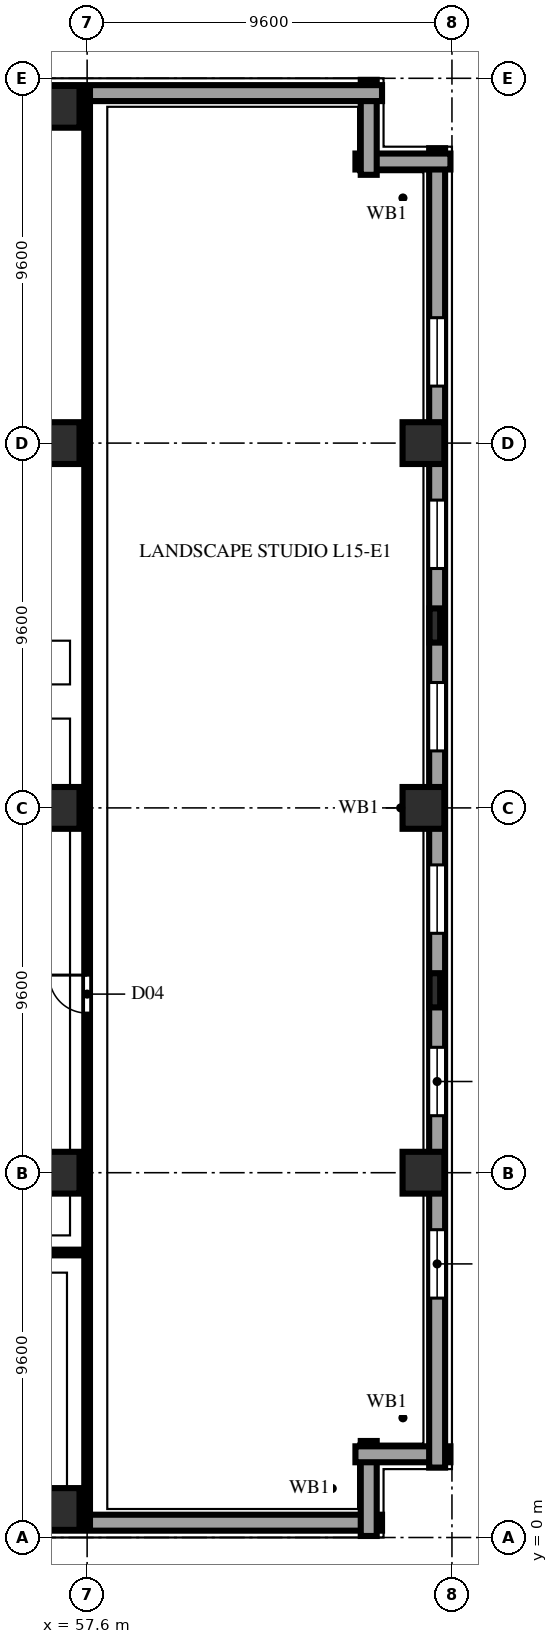
"""IFC4 building model, lengths in metres.
Left out: names, types, materials, properties, quantities, classifications, styles, units other than length and angle.
Written with IfcOpenShell. Run it as: python <this file> out.ifc"""

import sys

from ifc_helpers import new_model, si_unit, direction, frame, frame_2d, origin, origin_2d, place, context, subcontext, project, spatial, rectangle, extrude, element, fill, save


model = new_model("IFC4")
c1 = context("Model", 3, precision=1e-05, world=origin(), true_north=direction((0.0, 1.0)))
c2 = subcontext(c1, "Body", "Model", "MODEL_VIEW")
j1 = project(units=[si_unit("LENGTHUNIT", "METRE"), si_unit("PLANEANGLEUNIT", "RADIAN")], contexts=[c1])
p1 = place(None, origin())
s1 = spatial("IfcSite", under=j1, at=p1, CompositionType="ELEMENT")
p2 = place(p1, origin())
s2 = spatial("IfcBuilding", under=s1, at=p2, CompositionType="ELEMENT")
p3 = place(p2, frame((0.0, 0.0, 62.2)))
s3 = spatial("IfcBuildingStorey", under=s2, at=p3, CompositionType="ELEMENT", Elevation=62.2)
for number, where, z_axis, x_axis in (
    (1, (56.85, 0.75, 0.0), (0.0, 0.0, 1.0), (1.0, 0.0, 0.0)),
    (2, (56.85, 9.6, 0.0), (0.0, 0.0, 1.0), (1.0, 0.0, 0.0)),
    (3, (56.85, 19.2, 0.0), (0.0, 0.0, 1.0), (1.0, 0.0, 0.0)),
    (4, (56.85, 28.8, 0.0), (0.0, 0.0, 1.0), (1.0, 0.0, 0.0)),
    (5, (56.85, 37.65, 0.0), (0.0, 0.0, 1.0), (1.0, 0.0, 0.0)),
    (6, (66.45, 9.6, 0.0), (0.0, 0.0, 1.0), (1.0, 0.0, 0.0)),
    (7, (66.45, 19.2, 0.0), (0.0, 0.0, 1.0), (1.0, 0.0, 0.0)),
    (8, (66.45, 28.8, 0.0), (0.0, 0.0, 1.0), (1.0, 0.0, 0.0)),
):
    element("IfcColumn", number, at=place(p3, frame(where, z_axis=z_axis, x_axis=x_axis)), inside=s3, PredefinedType="COLUMN", context=c2, shape_type="SweptSolid", body=[
        extrude(rectangle(XDim=1.1, YDim=1.1, at=origin_2d()), origin(), (0.0, 0.0, 1.0), 3.8),
    ])
for number, where, z_axis, x_axis in (
    (9, (66.75, 14.4, 0.0), (0.0, 0.0, 1.0), (0.0, 1.0, 0.0)),
    (10, (66.75, 24.0, 0.0), (0.0, 0.0, 1.0), (0.0, 1.0, 0.0)),
):
    element("IfcColumn", number, at=place(p3, frame(where, z_axis=z_axis, x_axis=x_axis)), inside=s3, PredefinedType="PILASTER", context=c2, shape_type="SweptSolid", body=[
        extrude(rectangle(XDim=0.9, YDim=0.28, at=origin_2d()), origin(), (0.0, 0.0, 1.0), 3.8),
    ])
p4 = place(p3, frame((1.84, 0.39, 0.0), z_axis=(0.0, 0.0, 1.0), x_axis=(1.0, 0.0, 0.0)))
e11 = element("IfcWall", 11, at=p4, inside=s3, PredefinedType="SOLIDWALL", context=c2, shape_type="SweptSolid", body=[
    extrude(rectangle(XDim=63.52, YDim=0.42, at=frame_2d((31.76, 0.0))), origin(), (0.0, 0.0, 1.0), 3.54),
])
p5 = place(p4, frame((4.16, 0.0, 0.85)))
e12 = element("IfcOpeningElement", 12, at=p5, cuts=e11, PredefinedType="OPENING", context=c2, shape_type="SweptSolid", body=[
    extrude(rectangle(XDim=2.4, YDim=1.85, at=frame_2d((1.2, 0.925))), frame((0.0, 0.222, 0.0), z_axis=(0.0, -1.0, 0.0), x_axis=(1.0, 0.0, 0.0)), (0.0, 0.0, 1.0), 0.444),
])
p6 = place(p4, frame((8.96, 0.0, 0.85)))
e13 = element("IfcOpeningElement", 13, at=p6, cuts=e11, PredefinedType="OPENING", context=c2, shape_type="SweptSolid", body=[
    extrude(rectangle(XDim=2.4, YDim=1.85, at=frame_2d((1.2, 0.925))), frame((0.0, 0.222, 0.0), z_axis=(0.0, -1.0, 0.0), x_axis=(1.0, 0.0, 0.0)), (0.0, 0.0, 1.0), 0.444),
])
p7 = place(p4, frame((13.76, 0.0, 0.85)))
e14 = element("IfcOpeningElement", 14, at=p7, cuts=e11, PredefinedType="OPENING", context=c2, shape_type="SweptSolid", body=[
    extrude(rectangle(XDim=2.4, YDim=1.85, at=frame_2d((1.2, 0.925))), frame((0.0, 0.222, 0.0), z_axis=(0.0, -1.0, 0.0), x_axis=(1.0, 0.0, 0.0)), (0.0, 0.0, 1.0), 0.444),
])
p8 = place(p4, frame((18.56, 0.0, 0.85)))
e15 = element("IfcOpeningElement", 15, at=p8, cuts=e11, PredefinedType="OPENING", context=c2, shape_type="SweptSolid", body=[
    extrude(rectangle(XDim=2.4, YDim=1.85, at=frame_2d((1.2, 0.925))), frame((0.0, 0.222, 0.0), z_axis=(0.0, -1.0, 0.0), x_axis=(1.0, 0.0, 0.0)), (0.0, 0.0, 1.0), 0.444),
])
p9 = place(p4, frame((23.36, 0.0, 0.85)))
e16 = element("IfcOpeningElement", 16, at=p9, cuts=e11, PredefinedType="OPENING", context=c2, shape_type="SweptSolid", body=[
    extrude(rectangle(XDim=2.4, YDim=1.85, at=frame_2d((1.2, 0.925))), frame((0.0, 0.222, 0.0), z_axis=(0.0, -1.0, 0.0), x_axis=(1.0, 0.0, 0.0)), (0.0, 0.0, 1.0), 0.444),
])
p10 = place(p4, frame((28.16, 0.0, 0.85)))
e17 = element("IfcOpeningElement", 17, at=p10, cuts=e11, PredefinedType="OPENING", context=c2, shape_type="SweptSolid", body=[
    extrude(rectangle(XDim=2.4, YDim=1.85, at=frame_2d((1.2, 0.925))), frame((0.0, 0.222, 0.0), z_axis=(0.0, -1.0, 0.0), x_axis=(1.0, 0.0, 0.0)), (0.0, 0.0, 1.0), 0.444),
])
for number, where, z_axis, x_axis in (
    (18, (65.01, 0.04, 0.0), (0.0, 0.0, 1.0), (0.0, 1.0, 0.0)),
    (19, (64.66, 2.19, 0.0), (0.0, 0.0, 1.0), (1.0, 0.0, 0.0)),
):
    element("IfcWall", number, at=place(p3, frame(where, z_axis=z_axis, x_axis=x_axis)), inside=s3, PredefinedType="SOLIDWALL", context=c2, shape_type="SweptSolid", body=[
        extrude(rectangle(XDim=2.5, YDim=0.42, at=frame_2d((1.25, 0.0))), origin(), (0.0, 0.0, 1.0), 3.54),
    ])
p11 = place(p3, frame((66.81, 1.84, 0.0), z_axis=(0.0, 0.0, 1.0), x_axis=(0.0, 1.0, 0.0)))
e20 = element("IfcWall", 20, at=p11, inside=s3, PredefinedType="SOLIDWALL", context=c2, shape_type="SweptSolid", body=[
    extrude(rectangle(XDim=34.72, YDim=0.42, at=frame_2d((17.36, 0.0))), origin(), (0.0, 0.0, 1.0), 3.54),
])
p12 = place(p11, frame((4.46, 0.0, 0.85)))
e21 = element("IfcOpeningElement", 21, at=p12, cuts=e20, PredefinedType="OPENING", context=c2, shape_type="SweptSolid", body=[
    extrude(rectangle(XDim=1.8, YDim=1.85, at=frame_2d((0.9, 0.925))), frame((0.0, 0.222, 0.0), z_axis=(0.0, -1.0, 0.0), x_axis=(1.0, 0.0, 0.0)), (0.0, 0.0, 1.0), 0.444),
])
p13 = place(p11, frame((9.26, 0.0, 0.85)))
e22 = element("IfcOpeningElement", 22, at=p13, cuts=e20, PredefinedType="OPENING", context=c2, shape_type="SweptSolid", body=[
    extrude(rectangle(XDim=1.8, YDim=1.85, at=frame_2d((0.9, 0.925))), frame((0.0, 0.222, 0.0), z_axis=(0.0, -1.0, 0.0), x_axis=(1.0, 0.0, 0.0)), (0.0, 0.0, 1.0), 0.444),
])
p14 = place(p11, frame((14.06, 0.0, 0.85)))
e23 = element("IfcOpeningElement", 23, at=p14, cuts=e20, PredefinedType="OPENING", context=c2, shape_type="SweptSolid", body=[
    extrude(rectangle(XDim=1.8, YDim=1.85, at=frame_2d((0.9, 0.925))), frame((0.0, 0.222, 0.0), z_axis=(0.0, -1.0, 0.0), x_axis=(1.0, 0.0, 0.0)), (0.0, 0.0, 1.0), 0.444),
])
p15 = place(p11, frame((18.86, 0.0, 0.85)))
e24 = element("IfcOpeningElement", 24, at=p15, cuts=e20, PredefinedType="OPENING", context=c2, shape_type="SweptSolid", body=[
    extrude(rectangle(XDim=1.8, YDim=1.85, at=frame_2d((0.9, 0.925))), frame((0.0, 0.222, 0.0), z_axis=(0.0, -1.0, 0.0), x_axis=(1.0, 0.0, 0.0)), (0.0, 0.0, 1.0), 0.444),
])
p16 = place(p11, frame((23.66, 0.0, 0.85)))
e25 = element("IfcOpeningElement", 25, at=p16, cuts=e20, PredefinedType="OPENING", context=c2, shape_type="SweptSolid", body=[
    extrude(rectangle(XDim=1.8, YDim=1.85, at=frame_2d((0.9, 0.925))), frame((0.0, 0.222, 0.0), z_axis=(0.0, -1.0, 0.0), x_axis=(1.0, 0.0, 0.0)), (0.0, 0.0, 1.0), 0.444),
])
p17 = place(p11, frame((28.46, 0.0, 0.85)))
e26 = element("IfcOpeningElement", 26, at=p17, cuts=e20, PredefinedType="OPENING", context=c2, shape_type="SweptSolid", body=[
    extrude(rectangle(XDim=1.8, YDim=1.85, at=frame_2d((0.9, 0.925))), frame((0.0, 0.222, 0.0), z_axis=(0.0, -1.0, 0.0), x_axis=(1.0, 0.0, 0.0)), (0.0, 0.0, 1.0), 0.444),
])
for number, where, z_axis, x_axis in (
    (27, (67.16, 36.21, 0.0), (0.0, 0.0, 1.0), (-1.0, 0.0, 0.0)),
    (28, (65.01, 35.86, 0.0), (0.0, 0.0, 1.0), (0.0, 1.0, 0.0)),
):
    element("IfcWall", number, at=place(p3, frame(where, z_axis=z_axis, x_axis=x_axis)), inside=s3, PredefinedType="SOLIDWALL", context=c2, shape_type="SweptSolid", body=[
        extrude(rectangle(XDim=2.5, YDim=0.42, at=frame_2d((1.25, 0.0))), origin(), (0.0, 0.0, 1.0), 3.54),
    ])
p18 = place(p3, frame((65.36, 38.01, 0.0), z_axis=(0.0, 0.0, 1.0), x_axis=(-1.0, 0.0, 0.0)))
e29 = element("IfcWall", 29, at=p18, inside=s3, PredefinedType="SOLIDWALL", context=c2, shape_type="SweptSolid", body=[
    extrude(rectangle(XDim=27.7, YDim=0.42, at=frame_2d((13.85, 0.0))), origin(), (0.0, 0.0, 1.0), 3.54),
])
p19 = place(p3, frame((0.22, 7.5, 0.0), z_axis=(0.0, 0.0, 1.0), x_axis=(1.0, 0.0, 0.0)))
e30 = element("IfcWall", 30, at=p19, inside=s3, PredefinedType="PARTITIONING", context=c2, shape_type="SweptSolid", body=[
    extrude(rectangle(XDim=57.38, YDim=0.15, at=frame_2d((28.69, 0.0))), origin(), (0.0, 0.0, 1.0), 3.54),
])
p20 = place(p19, frame((13.68, 0.0, 0.0)))
e31 = element("IfcOpeningElement", 31, at=p20, cuts=e30, PredefinedType="OPENING", context=c2, shape_type="SweptSolid", body=[
    extrude(rectangle(XDim=1.0, YDim=2.2, at=frame_2d((0.5, 1.1))), frame((0.0, 0.087, 0.0), z_axis=(0.0, -1.0, 0.0), x_axis=(1.0, 0.0, 0.0)), (0.0, 0.0, 1.0), 0.174),
])
p21 = place(p19, frame((23.28, 0.0, 0.0)))
e32 = element("IfcOpeningElement", 32, at=p21, cuts=e30, PredefinedType="OPENING", context=c2, shape_type="SweptSolid", body=[
    extrude(rectangle(XDim=1.0, YDim=2.2, at=frame_2d((0.5, 1.1))), frame((0.0, 0.087, 0.0), z_axis=(0.0, -1.0, 0.0), x_axis=(1.0, 0.0, 0.0)), (0.0, 0.0, 1.0), 0.174),
])
p22 = place(p19, frame((41.68, 0.0, 0.0)))
e33 = element("IfcOpeningElement", 33, at=p22, cuts=e30, PredefinedType="OPENING", context=c2, shape_type="SweptSolid", body=[
    extrude(rectangle(XDim=1.2, YDim=2.2, at=frame_2d((0.6, 1.1))), frame((0.0, 0.087, 0.0), z_axis=(0.0, -1.0, 0.0), x_axis=(1.0, 0.0, 0.0)), (0.0, 0.0, 1.0), 0.174),
])
p23 = place(p19, frame((51.33, 0.0, 0.0)))
e34 = element("IfcOpeningElement", 34, at=p23, cuts=e30, PredefinedType="OPENING", context=c2, shape_type="SweptSolid", body=[
    extrude(rectangle(XDim=1.0, YDim=2.2, at=frame_2d((0.5, 1.1))), frame((0.0, 0.087, 0.0), z_axis=(0.0, -1.0, 0.0), x_axis=(1.0, 0.0, 0.0)), (0.0, 0.0, 1.0), 0.174),
])
p24 = place(p3, frame((57.6, 0.22, 0.0), z_axis=(0.0, 0.0, 1.0), x_axis=(0.0, 1.0, 0.0)))
e35 = element("IfcWall", 35, at=p24, inside=s3, PredefinedType="PARTITIONING", context=c2, shape_type="SweptSolid", body=[
    extrude(rectangle(XDim=37.96, YDim=0.15, at=frame_2d((18.98, 0.0))), origin(), (0.0, 0.0, 1.0), 3.54),
])
p25 = place(p24, frame((13.58, 0.0, 0.0)))
e36 = element("IfcOpeningElement", 36, at=p25, cuts=e35, PredefinedType="OPENING", context=c2, shape_type="SweptSolid", body=[
    extrude(rectangle(XDim=1.0, YDim=2.2, at=frame_2d((0.5, 1.1))), frame((0.0, 0.087, 0.0), z_axis=(0.0, -1.0, 0.0), x_axis=(1.0, 0.0, 0.0)), (0.0, 0.0, 1.0), 0.174),
])
p26 = place(p12, origin())
e37 = element("IfcWindow", 37, at=p26, inside=s3, PartitioningType="DOUBLE_PANEL_VERTICAL", PredefinedType="WINDOW", context=c2, shape_type="SweptSolid", body=[
    extrude(rectangle(XDim=1.8, YDim=1.85, at=frame_2d((0.9, 0.925))), frame((0.0, 0.11, 0.0), z_axis=(0.0, -1.0, 0.0), x_axis=(1.0, 0.0, 0.0)), (0.0, 0.0, 1.0), 0.06),
])
fill(e21, e37)
p27 = place(p13, origin())
e38 = element("IfcWindow", 38, at=p27, inside=s3, PartitioningType="DOUBLE_PANEL_VERTICAL", PredefinedType="WINDOW", context=c2, shape_type="SweptSolid", body=[
    extrude(rectangle(XDim=1.8, YDim=1.85, at=frame_2d((0.9, 0.925))), frame((0.0, 0.11, 0.0), z_axis=(0.0, -1.0, 0.0), x_axis=(1.0, 0.0, 0.0)), (0.0, 0.0, 1.0), 0.06),
])
fill(e22, e38)
p28 = place(p14, origin())
e39 = element("IfcWindow", 39, at=p28, inside=s3, PartitioningType="DOUBLE_PANEL_VERTICAL", PredefinedType="WINDOW", context=c2, shape_type="SweptSolid", body=[
    extrude(rectangle(XDim=1.8, YDim=1.85, at=frame_2d((0.9, 0.925))), frame((0.0, 0.11, 0.0), z_axis=(0.0, -1.0, 0.0), x_axis=(1.0, 0.0, 0.0)), (0.0, 0.0, 1.0), 0.06),
])
fill(e23, e39)
p29 = place(p15, origin())
e40 = element("IfcWindow", 40, at=p29, inside=s3, PartitioningType="DOUBLE_PANEL_VERTICAL", PredefinedType="WINDOW", context=c2, shape_type="SweptSolid", body=[
    extrude(rectangle(XDim=1.8, YDim=1.85, at=frame_2d((0.9, 0.925))), frame((0.0, 0.11, 0.0), z_axis=(0.0, -1.0, 0.0), x_axis=(1.0, 0.0, 0.0)), (0.0, 0.0, 1.0), 0.06),
])
fill(e24, e40)
p30 = place(p16, origin())
e41 = element("IfcWindow", 41, at=p30, inside=s3, PartitioningType="DOUBLE_PANEL_VERTICAL", PredefinedType="WINDOW", context=c2, shape_type="SweptSolid", body=[
    extrude(rectangle(XDim=1.8, YDim=1.85, at=frame_2d((0.9, 0.925))), frame((0.0, 0.11, 0.0), z_axis=(0.0, -1.0, 0.0), x_axis=(1.0, 0.0, 0.0)), (0.0, 0.0, 1.0), 0.06),
])
fill(e25, e41)
p31 = place(p17, origin())
e42 = element("IfcWindow", 42, at=p31, inside=s3, PartitioningType="DOUBLE_PANEL_VERTICAL", PredefinedType="WINDOW", context=c2, shape_type="SweptSolid", body=[
    extrude(rectangle(XDim=1.8, YDim=1.85, at=frame_2d((0.9, 0.925))), frame((0.0, 0.11, 0.0), z_axis=(0.0, -1.0, 0.0), x_axis=(1.0, 0.0, 0.0)), (0.0, 0.0, 1.0), 0.06),
])
fill(e26, e42)
p32 = place(p25, origin())
e43 = element("IfcDoor", 43, at=p32, inside=s3, OperationType="SINGLE_SWING_RIGHT", PredefinedType="DOOR", context=c2, shape_type="SweptSolid", body=[
    extrude(rectangle(XDim=1.0, YDim=2.2, at=frame_2d((0.5, 1.1))), frame((0.0, 0.025, 0.0), z_axis=(0.0, -1.0, 0.0), x_axis=(1.0, 0.0, 0.0)), (0.0, 0.0, 1.0), 0.05),
])
fill(e36, e43)
save(model, sys.argv[1])
